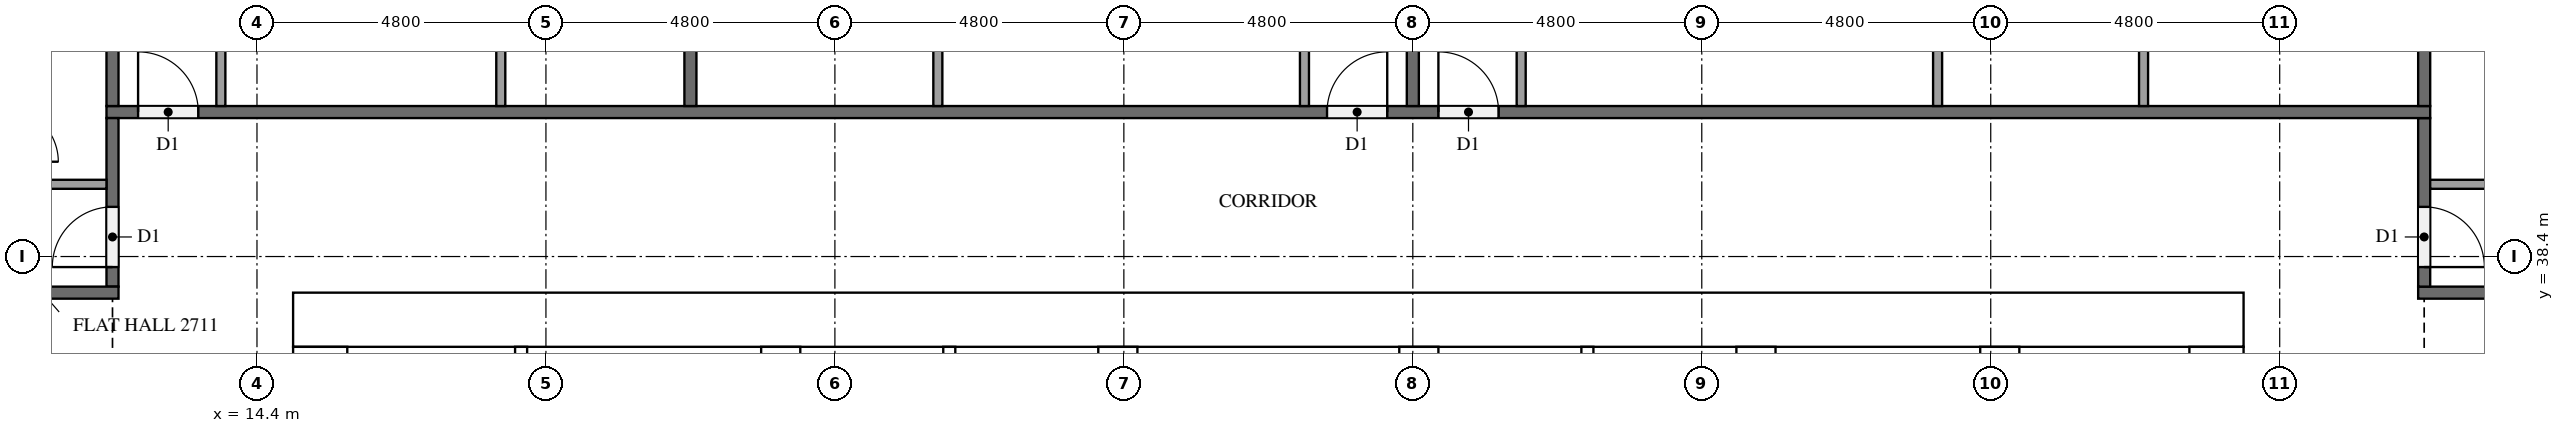
"""IFC4 building model, lengths in metres.
Left out: names, types, materials, properties, quantities, classifications, styles, units other than length and angle.
Written with IfcOpenShell. Run it as: python <this file> out.ifc"""

import sys

from ifc_helpers import new_model, si_unit, direction, frame, frame_2d, origin, place, context, subcontext, project, spatial, rectangle, extrude, element, fill, save


model = new_model("IFC4")
c1 = context("Model", 3, precision=1e-05, world=origin(), true_north=direction((0.0, 1.0)))
c2 = subcontext(c1, "Body", "Model", "MODEL_VIEW")
j1 = project(units=[si_unit("LENGTHUNIT", "METRE"), si_unit("PLANEANGLEUNIT", "RADIAN")], contexts=[c1])
p1 = place(None, origin())
s1 = spatial("IfcSite", under=j1, at=p1, CompositionType="ELEMENT")
p2 = place(p1, origin())
s2 = spatial("IfcBuilding", under=s1, at=p2, CompositionType="ELEMENT")
p3 = place(p2, frame((0.0, 0.0, 106.7)))
s3 = spatial("IfcBuildingStorey", under=s2, at=p3, CompositionType="ELEMENT", Elevation=106.7)
p4 = place(p3, frame((15.0, 37.35, 0.0), z_axis=(0.0, 0.0, 1.0), x_axis=(1.0, 0.0, 0.0)))
e1 = element("IfcWall", 1, at=p4, inside=s3, PredefinedType="SHEAR", context=c2, shape_type="SweptSolid", body=[
    extrude(rectangle(XDim=32.4, YDim=0.9, at=frame_2d((16.2, 0.0))), origin(), (0.0, 0.0, 1.0), 3.2),
])
p5 = place(p4, frame((15.3, 0.0, 0.0)))
e2 = element("IfcOpeningElement", 2, at=p5, cuts=e1, PredefinedType="OPENING", context=c2, shape_type="SweptSolid", body=[
    extrude(rectangle(XDim=1.8, YDim=2.1, at=frame_2d((0.9, 1.05))), frame((0.0, 0.46, 0.0), z_axis=(0.0, -1.0, 0.0), x_axis=(1.0, 0.0, 0.0)), (0.0, 0.0, 1.0), 0.92),
])
p6 = place(p4, frame((1.794, 0.0, 0.0)))
e3 = element("IfcOpeningElement", 3, at=p6, cuts=e1, PredefinedType="OPENING", context=c2, shape_type="SweptSolid", body=[
    extrude(rectangle(XDim=1.0, YDim=2.1, at=frame_2d((0.5, 1.05))), frame((0.0, 0.46, 0.0), z_axis=(0.0, -1.0, 0.0), x_axis=(1.0, 0.0, 0.0)), (0.0, 0.0, 1.0), 0.92),
])
p7 = place(p4, frame((5.331, 0.0, 0.0)))
e4 = element("IfcOpeningElement", 4, at=p7, cuts=e1, PredefinedType="OPENING", context=c2, shape_type="SweptSolid", body=[
    extrude(rectangle(XDim=1.0, YDim=2.1, at=frame_2d((0.5, 1.05))), frame((0.0, 0.46, 0.0), z_axis=(0.0, -1.0, 0.0), x_axis=(1.0, 0.0, 0.0)), (0.0, 0.0, 1.0), 0.92),
])
p8 = place(p3, frame((15.45, 15.9, 0.0), z_axis=(0.0, 0.0, 1.0), x_axis=(0.0, 1.0, 0.0)))
e5 = element("IfcWall", 5, at=p8, inside=s3, PredefinedType="SHEAR", context=c2, shape_type="SweptSolid", body=[
    extrude(rectangle(XDim=21.0, YDim=0.9, at=frame_2d((10.5, 0.0))), origin(), (0.0, 0.0, 1.0), 3.2),
])
p9 = place(p8, frame((4.86, 0.0, 0.0)))
e6 = element("IfcOpeningElement", 6, at=p9, cuts=e5, PredefinedType="OPENING", context=c2, shape_type="SweptSolid", body=[
    extrude(rectangle(XDim=1.2, YDim=2.1, at=frame_2d((0.6, 1.05))), frame((0.0, 0.46, 0.0), z_axis=(0.0, -1.0, 0.0), x_axis=(1.0, 0.0, 0.0)), (0.0, 0.0, 1.0), 0.92),
])
p10 = place(p3, frame((46.95, 15.9, 0.0), z_axis=(0.0, 0.0, 1.0), x_axis=(0.0, 1.0, 0.0)))
e7 = element("IfcWall", 7, at=p10, inside=s3, PredefinedType="SHEAR", context=c2, shape_type="SweptSolid", body=[
    extrude(rectangle(XDim=21.0, YDim=0.9, at=frame_2d((10.5, 0.0))), origin(), (0.0, 0.0, 1.0), 3.2),
])
p11 = place(p10, frame((10.2, 0.0, 0.0)))
e8 = element("IfcOpeningElement", 8, at=p11, cuts=e7, PredefinedType="OPENING", context=c2, shape_type="SweptSolid", body=[
    extrude(rectangle(XDim=1.2, YDim=2.1, at=frame_2d((0.6, 1.05))), frame((0.0, 0.46, 0.0), z_axis=(0.0, -1.0, 0.0), x_axis=(1.0, 0.0, 0.0)), (0.0, 0.0, 1.0), 0.92),
])
p12 = place(p3, frame((23.1, 15.9, 0.0), z_axis=(0.0, 0.0, 1.0), x_axis=(0.0, 1.0, 0.0)))
e9 = element("IfcWall", 9, at=p12, inside=s3, PredefinedType="SHEAR", context=c2, shape_type="SweptSolid", body=[
    extrude(rectangle(XDim=21.0, YDim=0.65, at=frame_2d((10.5, 0.0))), origin(), (0.0, 0.0, 1.0), 3.2),
])
p13 = place(p3, frame((39.3, 27.75, 0.0), z_axis=(0.0, 0.0, 1.0), x_axis=(0.0, 1.0, 0.0)))
e10 = element("IfcWall", 10, at=p13, inside=s3, PredefinedType="SHEAR", context=c2, shape_type="SweptSolid", body=[
    extrude(rectangle(XDim=9.15, YDim=0.65, at=frame_2d((4.575, 0.0))), origin(), (0.0, 0.0, 1.0), 3.2),
])
p14 = place(p3, frame((43.35, 27.75, 0.0), z_axis=(0.0, 0.0, 1.0), x_axis=(0.0, 1.0, 0.0)))
e11 = element("IfcWall", 11, at=p14, inside=s3, PredefinedType="SHEAR", context=c2, shape_type="SweptSolid", body=[
    extrude(rectangle(XDim=9.15, YDim=0.65, at=frame_2d((4.575, 0.0))), origin(), (0.0, 0.0, 1.0), 3.2),
])
p15 = place(p14, frame((7.65, 0.0, 0.0)))
e12 = element("IfcOpeningElement", 12, at=p15, cuts=e11, PredefinedType="OPENING", context=c2, shape_type="SweptSolid", body=[
    extrude(rectangle(XDim=1.2, YDim=2.1, at=frame_2d((0.6, 1.05))), frame((0.0, 0.335, 0.0), z_axis=(0.0, -1.0, 0.0), x_axis=(1.0, 0.0, 0.0)), (0.0, 0.0, 1.0), 0.67),
])
for number, where, z_axis, x_axis in (
    (13, (28.7, 33.875, 0.0), (0.0, 0.0, 1.0), (0.0, 1.0, 0.0)),
    (14, (33.7, 33.875, 0.0), (0.0, 0.0, 1.0), (0.0, 1.0, 0.0)),
):
    element("IfcWall", number, at=place(p3, frame(where, z_axis=z_axis, x_axis=x_axis)), inside=s3, PredefinedType="SHEAR", context=c2, shape_type="SweptSolid", body=[
        extrude(rectangle(XDim=3.025, YDim=0.65, at=frame_2d((1.512, 0.0))), origin(), (0.0, 0.0, 1.0), 3.2),
    ])
for number, where, z_axis, x_axis in (
    (15, (25.9, 33.875, 0.0), (0.0, 0.0, 1.0), (0.0, 1.0, 0.0)),
    (16, (36.5, 33.875, 0.0), (0.0, 0.0, 1.0), (0.0, 1.0, 0.0)),
):
    element("IfcWall", number, at=place(p3, frame(where, z_axis=z_axis, x_axis=x_axis)), inside=s3, PredefinedType="SOLIDWALL", context=c2, shape_type="SweptSolid", body=[
        extrude(rectangle(XDim=3.025, YDim=0.2, at=frame_2d((1.512, 0.0))), origin(), (0.0, 0.0, 1.0), 3.2),
    ])
p16 = place(p3, frame((18.788, 31.575, 0.0), z_axis=(0.0, 0.0, 1.0), x_axis=(0.0, 1.0, 0.0)))
e17 = element("IfcWall", 17, at=p16, inside=s3, PredefinedType="PARTITIONING", context=c2, shape_type="SweptSolid", body=[
    extrude(rectangle(XDim=5.325, YDim=0.2, at=frame_2d((2.663, 0.0))), origin(), (0.0, 0.0, 1.0), 3.2),
])
p17 = place(p3, frame((52.5, 37.8, 0.0), z_axis=(0.0, 0.0, 1.0), x_axis=(-1.0, 0.0, 0.0)))
e18 = element("IfcWall", 18, at=p17, inside=s3, PredefinedType="PARTITIONING", context=c2, shape_type="SweptSolid", body=[
    extrude(rectangle(XDim=2.2, YDim=0.2, at=frame_2d((1.1, 0.0))), origin(), (0.0, 0.0, 1.0), 3.2),
])
p18 = place(p3, frame((50.4, 40.7, 0.0), z_axis=(0.0, 0.0, 1.0), x_axis=(0.0, -1.0, 0.0)))
e19 = element("IfcWall", 19, at=p18, inside=s3, PredefinedType="PARTITIONING", context=c2, shape_type="SweptSolid", body=[
    extrude(rectangle(XDim=2.8, YDim=0.2, at=frame_2d((1.4, 0.0))), origin(), (0.0, 0.0, 1.0), 3.2),
])
p19 = place(p18, frame((1.475, 0.0, 0.0)))
e20 = element("IfcOpeningElement", 20, at=p19, cuts=e19, PredefinedType="OPENING", context=c2, shape_type="SweptSolid", body=[
    extrude(rectangle(XDim=1.0, YDim=2.1, at=frame_2d((0.5, 1.05))), frame((0.0, 0.11, 0.0), z_axis=(0.0, -1.0, 0.0), x_axis=(1.0, 0.0, 0.0)), (0.0, 0.0, 1.0), 0.22),
])
p20 = place(p3, frame((11.9, 40.8, 0.0), z_axis=(0.0, 0.0, 1.0), x_axis=(1.0, 0.0, 0.0)))
e21 = element("IfcWall", 21, at=p20, inside=s3, PredefinedType="PARTITIONING", context=c2, shape_type="SweptSolid", body=[
    extrude(rectangle(XDim=38.6, YDim=0.2, at=frame_2d((19.3, 0.0))), origin(), (0.0, 0.0, 1.0), 3.2),
])
p21 = place(p20, frame((22.125, 0.0, 0.0)))
e22 = element("IfcOpeningElement", 22, at=p21, cuts=e21, PredefinedType="OPENING", context=c2, shape_type="SweptSolid", body=[
    extrude(rectangle(XDim=1.0, YDim=2.1, at=frame_2d((0.5, 1.05))), frame((0.0, 0.11, 0.0), z_axis=(0.0, -1.0, 0.0), x_axis=(1.0, 0.0, 0.0)), (0.0, 0.0, 1.0), 0.22),
])
p22 = place(p20, frame((20.275, 0.0, 0.0)))
e23 = element("IfcOpeningElement", 23, at=p22, cuts=e21, PredefinedType="OPENING", context=c2, shape_type="SweptSolid", body=[
    extrude(rectangle(XDim=1.0, YDim=2.1, at=frame_2d((0.5, 1.05))), frame((0.0, 0.11, 0.0), z_axis=(0.0, -1.0, 0.0), x_axis=(1.0, 0.0, 0.0)), (0.0, 0.0, 1.0), 0.22),
])
p23 = place(p20, frame((0.525, 0.0, 0.0)))
e24 = element("IfcOpeningElement", 24, at=p23, cuts=e21, PredefinedType="OPENING", context=c2, shape_type="SweptSolid", body=[
    extrude(rectangle(XDim=1.0, YDim=2.1, at=frame_2d((0.5, 1.05))), frame((0.0, 0.11, 0.0), z_axis=(0.0, -1.0, 0.0), x_axis=(1.0, 0.0, 0.0)), (0.0, 0.0, 1.0), 0.22),
])
p24 = place(p3, frame((12.0, 37.9, 0.0), z_axis=(0.0, 0.0, 1.0), x_axis=(0.0, 1.0, 0.0)))
e25 = element("IfcWall", 25, at=p24, inside=s3, PredefinedType="PARTITIONING", context=c2, shape_type="SweptSolid", body=[
    extrude(rectangle(XDim=2.8, YDim=0.2, at=frame_2d((1.4, 0.0))), origin(), (0.0, 0.0, 1.0), 3.2),
])
p25 = place(p24, frame((0.325, 0.0, 0.0)))
e26 = element("IfcOpeningElement", 26, at=p25, cuts=e25, PredefinedType="OPENING", context=c2, shape_type="SweptSolid", body=[
    extrude(rectangle(XDim=1.0, YDim=2.1, at=frame_2d((0.5, 1.05))), frame((0.0, 0.11, 0.0), z_axis=(0.0, -1.0, 0.0), x_axis=(1.0, 0.0, 0.0)), (0.0, 0.0, 1.0), 0.22),
])
p26 = place(p3, frame((12.1, 37.8, 0.0), z_axis=(0.0, 0.0, 1.0), x_axis=(-1.0, 0.0, 0.0)))
e27 = element("IfcWall", 27, at=p26, inside=s3, PredefinedType="PARTITIONING", context=c2, shape_type="SweptSolid", body=[
    extrude(rectangle(XDim=2.2, YDim=0.2, at=frame_2d((1.1, 0.0))), origin(), (0.0, 0.0, 1.0), 3.2),
])
for number, where, z_axis, x_axis in (
    (28, (50.4, 40.9, 0.0), (0.0, 0.0, 1.0), (0.0, 1.0, 0.0)),
    (29, (33.6, 52.7, 0.0), (0.0, 0.0, 1.0), (0.0, -1.0, 0.0)),
    (30, (21.6, 52.7, 0.0), (0.0, 0.0, 1.0), (0.0, -1.0, 0.0)),
    (31, (12.0, 52.7, 0.0), (0.0, 0.0, 1.0), (0.0, -1.0, 0.0)),
):
    element("IfcWall", number, at=place(p3, frame(where, z_axis=z_axis, x_axis=x_axis)), inside=s3, PredefinedType="PARTITIONING", context=c2, shape_type="SweptSolid", body=[
        extrude(rectangle(XDim=11.8, YDim=0.2, at=frame_2d((5.9, 0.0))), origin(), (0.0, 0.0, 1.0), 3.2),
    ])
p27 = place(p3, frame((50.5, 39.6, 0.0), z_axis=(0.0, 0.0, 1.0), x_axis=(1.0, 0.0, 0.0)))
e32 = element("IfcWall", 32, at=p27, inside=s3, PredefinedType="PARTITIONING", context=c2, shape_type="SweptSolid", body=[
    extrude(rectangle(XDim=4.625, YDim=0.15, at=frame_2d((2.312, 0.0))), origin(), (0.0, 0.0, 1.0), 3.2),
])
for number, where, z_axis, x_axis in (
    (33, (42.317, 40.9, 0.0), (0.0, 0.0, 1.0), (0.0, 1.0, 0.0)),
    (34, (45.739, 40.9, 0.0), (0.0, 0.0, 1.0), (0.0, 1.0, 0.0)),
):
    element("IfcWall", number, at=place(p3, frame(where, z_axis=z_axis, x_axis=x_axis)), inside=s3, PredefinedType="PARTITIONING", context=c2, shape_type="SweptSolid", body=[
        extrude(rectangle(XDim=3.875, YDim=0.15, at=frame_2d((1.938, 0.0))), origin(), (0.0, 0.0, 1.0), 3.2),
    ])
p28 = place(p3, frame((35.4, 40.9, 0.0), z_axis=(0.0, 0.0, 1.0), x_axis=(0.0, 1.0, 0.0)))
e35 = element("IfcWall", 35, at=p28, inside=s3, PredefinedType="PARTITIONING", context=c2, shape_type="SweptSolid", body=[
    extrude(rectangle(XDim=4.025, YDim=0.15, at=frame_2d((2.013, 0.0))), origin(), (0.0, 0.0, 1.0), 3.2),
])
p29 = place(p3, frame((25.71, 40.9, 0.0), z_axis=(0.0, 0.0, 1.0), x_axis=(0.0, 1.0, 0.0)))
e36 = element("IfcWall", 36, at=p29, inside=s3, PredefinedType="PARTITIONING", context=c2, shape_type="SweptSolid", body=[
    extrude(rectangle(XDim=3.125, YDim=0.15, at=frame_2d((1.562, 0.0))), origin(), (0.0, 0.0, 1.0), 3.2),
])
p30 = place(p3, frame((31.8, 40.9, 0.0), z_axis=(0.0, 0.0, 1.0), x_axis=(0.0, 1.0, 0.0)))
e37 = element("IfcWall", 37, at=p30, inside=s3, PredefinedType="PARTITIONING", context=c2, shape_type="SweptSolid", body=[
    extrude(rectangle(XDim=3.275, YDim=0.15, at=frame_2d((1.638, 0.0))), origin(), (0.0, 0.0, 1.0), 3.2),
])
p31 = place(p3, frame((18.45, 40.9, 0.0), z_axis=(0.0, 0.0, 1.0), x_axis=(0.0, 1.0, 0.0)))
e38 = element("IfcWall", 38, at=p31, inside=s3, PredefinedType="PARTITIONING", context=c2, shape_type="SweptSolid", body=[
    extrude(rectangle(XDim=3.875, YDim=0.15, at=frame_2d((1.938, 0.0))), origin(), (0.0, 0.0, 1.0), 3.2),
])
p32 = place(p3, frame((13.8, 40.9, 0.0), z_axis=(0.0, 0.0, 1.0), x_axis=(0.0, 1.0, 0.0)))
e39 = element("IfcWall", 39, at=p32, inside=s3, PredefinedType="PARTITIONING", context=c2, shape_type="SweptSolid", body=[
    extrude(rectangle(XDim=4.025, YDim=0.15, at=frame_2d((2.013, 0.0))), origin(), (0.0, 0.0, 1.0), 3.2),
])
p33 = place(p3, frame((11.9, 39.6, 0.0), z_axis=(0.0, 0.0, 1.0), x_axis=(-1.0, 0.0, 0.0)))
e40 = element("IfcWall", 40, at=p33, inside=s3, PredefinedType="PARTITIONING", context=c2, shape_type="SweptSolid", body=[
    extrude(rectangle(XDim=1.775, YDim=0.15, at=frame_2d((0.887, 0.0))), origin(), (0.0, 0.0, 1.0), 3.2),
])
p34 = place(p5, origin())
e41 = element("IfcDoor", 41, at=p34, inside=s3, OperationType="DOUBLE_DOOR_SINGLE_SWING", PredefinedType="DOOR", context=c2, shape_type="SweptSolid", body=[
    extrude(rectangle(XDim=1.8, YDim=2.1, at=frame_2d((0.9, 1.05))), frame((0.0, 0.025, 0.0), z_axis=(0.0, -1.0, 0.0), x_axis=(1.0, 0.0, 0.0)), (0.0, 0.0, 1.0), 0.05),
])
fill(e2, e41)
p35 = place(p6, origin())
e42 = element("IfcDoor", 42, at=p35, inside=s3, OperationType="SINGLE_SWING_RIGHT", PredefinedType="DOOR", context=c2, shape_type="SweptSolid", body=[
    extrude(rectangle(XDim=1.0, YDim=2.1, at=frame_2d((0.5, 1.05))), frame((0.0, 0.025, 0.0), z_axis=(0.0, -1.0, 0.0), x_axis=(1.0, 0.0, 0.0)), (0.0, 0.0, 1.0), 0.05),
])
fill(e3, e42)
p36 = place(p7, origin())
e43 = element("IfcDoor", 43, at=p36, inside=s3, OperationType="SINGLE_SWING_LEFT", PredefinedType="DOOR", context=c2, shape_type="SweptSolid", body=[
    extrude(rectangle(XDim=1.0, YDim=2.1, at=frame_2d((0.5, 1.05))), frame((0.0, 0.025, 0.0), z_axis=(0.0, -1.0, 0.0), x_axis=(1.0, 0.0, 0.0)), (0.0, 0.0, 1.0), 0.05),
])
fill(e4, e43)
p37 = place(p19, origin())
e44 = element("IfcDoor", 44, at=p37, inside=s3, OperationType="SINGLE_SWING_RIGHT", PredefinedType="DOOR", context=c2, shape_type="SweptSolid", body=[
    extrude(rectangle(XDim=1.0, YDim=2.1, at=frame_2d((0.5, 1.05))), frame((0.0, 0.025, 0.0), z_axis=(0.0, -1.0, 0.0), x_axis=(1.0, 0.0, 0.0)), (0.0, 0.0, 1.0), 0.05),
])
fill(e20, e44)
p38 = place(p21, origin())
e45 = element("IfcDoor", 45, at=p38, inside=s3, OperationType="SINGLE_SWING_LEFT", PredefinedType="DOOR", context=c2, shape_type="SweptSolid", body=[
    extrude(rectangle(XDim=1.0, YDim=2.1, at=frame_2d((0.5, 1.05))), frame((0.0, 0.025, 0.0), z_axis=(0.0, -1.0, 0.0), x_axis=(1.0, 0.0, 0.0)), (0.0, 0.0, 1.0), 0.05),
])
fill(e22, e45)
p39 = place(p22, origin())
e46 = element("IfcDoor", 46, at=p39, inside=s3, OperationType="SINGLE_SWING_RIGHT", PredefinedType="DOOR", context=c2, shape_type="SweptSolid", body=[
    extrude(rectangle(XDim=1.0, YDim=2.1, at=frame_2d((0.5, 1.05))), frame((0.0, 0.025, 0.0), z_axis=(0.0, -1.0, 0.0), x_axis=(1.0, 0.0, 0.0)), (0.0, 0.0, 1.0), 0.05),
])
fill(e23, e46)
p40 = place(p23, origin())
e47 = element("IfcDoor", 47, at=p40, inside=s3, OperationType="SINGLE_SWING_LEFT", PredefinedType="DOOR", context=c2, shape_type="SweptSolid", body=[
    extrude(rectangle(XDim=1.0, YDim=2.1, at=frame_2d((0.5, 1.05))), frame((0.0, 0.025, 0.0), z_axis=(0.0, -1.0, 0.0), x_axis=(1.0, 0.0, 0.0)), (0.0, 0.0, 1.0), 0.05),
])
fill(e24, e47)
p41 = place(p25, origin())
e48 = element("IfcDoor", 48, at=p41, inside=s3, OperationType="SINGLE_SWING_LEFT", PredefinedType="DOOR", context=c2, shape_type="SweptSolid", body=[
    extrude(rectangle(XDim=1.0, YDim=2.1, at=frame_2d((0.5, 1.05))), frame((0.0, 0.025, 0.0), z_axis=(0.0, -1.0, 0.0), x_axis=(1.0, 0.0, 0.0)), (0.0, 0.0, 1.0), 0.05),
])
fill(e26, e48)
save(model, sys.argv[1])
